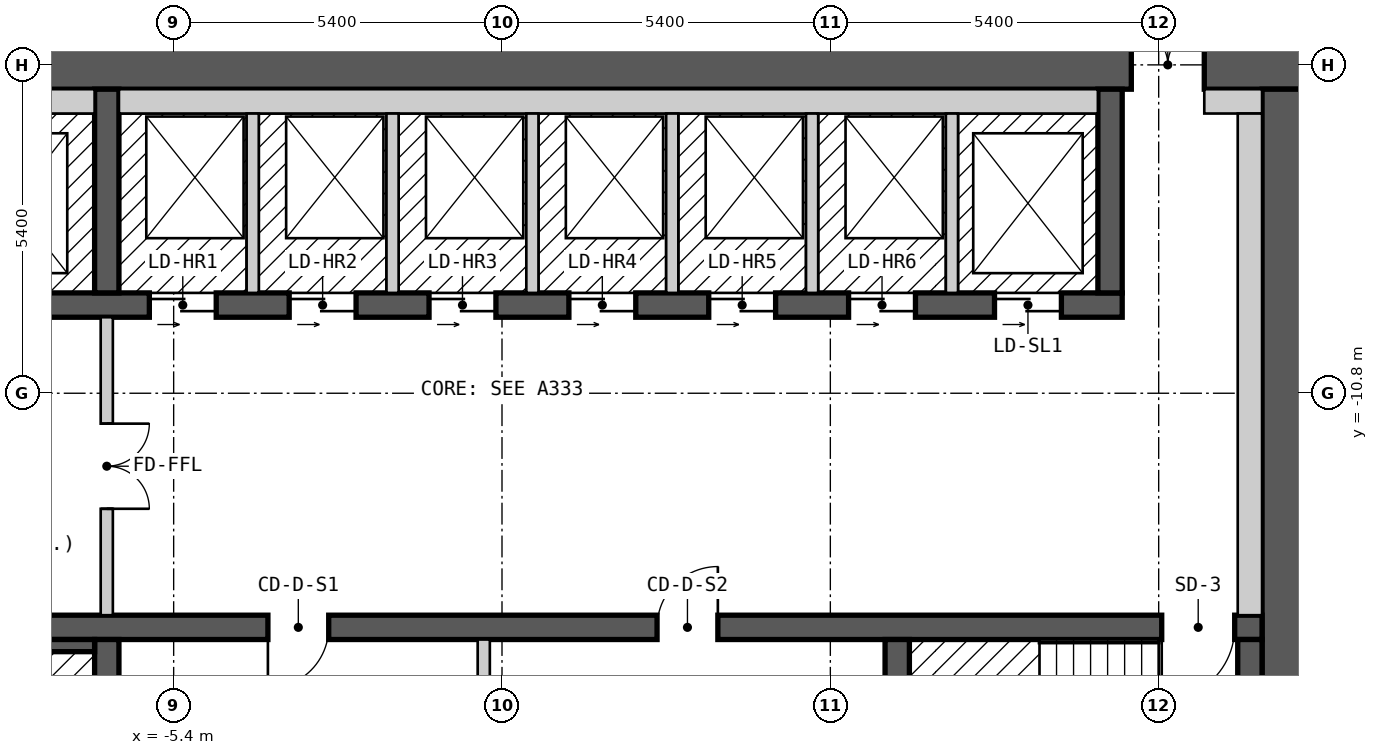
"""IFC4 building model, lengths in metres.
Left out: names, types, materials, properties, quantities, classifications, styles, units other than length and angle.
Written with IfcOpenShell. Run it as: python <this file> out.ifc"""

import sys

from ifc_helpers import new_model, si_unit, direction, frame, frame_2d, origin, place, context, subcontext, project, spatial, rectangle, extrude, element, fill, save


model = new_model("IFC4")
c1 = context("Model", 3, precision=1e-05, world=origin(), true_north=direction((0.0, 1.0)))
c2 = subcontext(c1, "Body", "Model", "MODEL_VIEW")
j1 = project(units=[si_unit("LENGTHUNIT", "METRE"), si_unit("PLANEANGLEUNIT", "RADIAN")], contexts=[c1])
p1 = place(None, origin())
s1 = spatial("IfcSite", under=j1, at=p1, CompositionType="ELEMENT")
p2 = place(p1, origin())
s2 = spatial("IfcBuilding", under=s1, at=p2, CompositionType="ELEMENT")
p3 = place(p2, frame((0.0, 0.0, 117.6)))
s3 = spatial("IfcBuildingStorey", under=s2, at=p3, CompositionType="ELEMENT", Elevation=117.6)
p4 = place(p3, frame((-13.3, -5.4, 0.0), z_axis=(0.0, 0.0, 1.0), x_axis=(1.0, 0.0, 0.0)))
e1 = element("IfcWall", 1, at=p4, inside=s3, PredefinedType="SHEAR", context=c2, shape_type="SweptSolid", body=[
    extrude(rectangle(XDim=26.6, YDim=0.8, at=frame_2d((13.3, 0.0))), origin(), (0.0, 0.0, 1.0), 2.7),
])
p5 = place(p4, frame((23.65, 0.0, 0.0)))
e2 = element("IfcOpeningElement", 2, at=p5, cuts=e1, PredefinedType="OPENING", context=c2, shape_type="SweptSolid", body=[
    extrude(rectangle(XDim=1.2, YDim=2.1, at=frame_2d((0.6, 1.05))), frame((0.0, 0.41, 0.0), z_axis=(0.0, -1.0, 0.0), x_axis=(1.0, 0.0, 0.0)), (0.0, 0.0, 1.0), 0.82),
])
p6 = place(p3, frame((12.9, -18.2, 0.0), z_axis=(0.0, 0.0, 1.0), x_axis=(0.0, 1.0, 0.0)))
e3 = element("IfcWall", 3, at=p6, inside=s3, PredefinedType="SHEAR", context=c2, shape_type="SweptSolid", body=[
    extrude(rectangle(XDim=12.4, YDim=0.8, at=frame_2d((6.2, 0.0))), origin(), (0.0, 0.0, 1.0), 2.7),
])
p7 = place(p3, frame((-12.5, -14.65, 0.0), z_axis=(0.0, 0.0, 1.0), x_axis=(1.0, 0.0, 0.0)))
e4 = element("IfcWall", 4, at=p7, inside=s3, PredefinedType="SHEAR", context=c2, shape_type="SweptSolid", body=[
    extrude(rectangle(XDim=25.0, YDim=0.4, at=frame_2d((12.5, 0.0))), origin(), (0.0, 0.0, 1.0), 2.7),
])
p8 = place(p7, frame((1.7, 0.0, 0.0), z_axis=(0.0, 0.0, 1.0), x_axis=(-1.0, 0.0, 0.0)))
e5 = element("IfcOpeningElement", 5, at=p8, cuts=e4, PredefinedType="OPENING", context=c2, shape_type="SweptSolid", body=[
    extrude(rectangle(XDim=1.2, YDim=2.1, at=frame_2d((0.6, 1.05))), frame((0.0, 0.21, 0.0), z_axis=(0.0, -1.0, 0.0), x_axis=(1.0, 0.0, 0.0)), (0.0, 0.0, 1.0), 0.42),
])
p9 = place(p7, frame((24.55, 0.0, 0.0), z_axis=(0.0, 0.0, 1.0), x_axis=(-1.0, 0.0, 0.0)))
e6 = element("IfcOpeningElement", 6, at=p9, cuts=e4, PredefinedType="OPENING", context=c2, shape_type="SweptSolid", body=[
    extrude(rectangle(XDim=1.2, YDim=2.1, at=frame_2d((0.6, 1.05))), frame((0.0, 0.21, 0.0), z_axis=(0.0, -1.0, 0.0), x_axis=(1.0, 0.0, 0.0)), (0.0, 0.0, 1.0), 0.42),
])
p10 = place(p7, frame((9.65, 0.0, 0.0), z_axis=(0.0, 0.0, 1.0), x_axis=(-1.0, 0.0, 0.0)))
e7 = element("IfcOpeningElement", 7, at=p10, cuts=e4, PredefinedType="OPENING", context=c2, shape_type="SweptSolid", body=[
    extrude(rectangle(XDim=1.0, YDim=2.1, at=frame_2d((0.5, 1.05))), frame((0.0, 0.21, 0.0), z_axis=(0.0, -1.0, 0.0), x_axis=(1.0, 0.0, 0.0)), (0.0, 0.0, 1.0), 0.42),
])
p11 = place(p7, frame((16.05, 0.0, 0.0), z_axis=(0.0, 0.0, 1.0), x_axis=(-1.0, 0.0, 0.0)))
e8 = element("IfcOpeningElement", 8, at=p11, cuts=e4, PredefinedType="OPENING", context=c2, shape_type="SweptSolid", body=[
    extrude(rectangle(XDim=1.0, YDim=2.1, at=frame_2d((0.5, 1.05))), frame((0.0, 0.21, 0.0), z_axis=(0.0, -1.0, 0.0), x_axis=(1.0, 0.0, 0.0)), (0.0, 0.0, 1.0), 0.42),
])
p12 = place(p3, frame((-12.5, -9.35, 0.0), z_axis=(0.0, 0.0, 1.0), x_axis=(1.0, 0.0, 0.0)))
e9 = element("IfcWall", 9, at=p12, inside=s3, PredefinedType="SHEAR", context=c2, shape_type="SweptSolid", body=[
    extrude(rectangle(XDim=22.7, YDim=0.4, at=frame_2d((11.35, 0.0))), origin(), (0.0, 0.0, 1.0), 2.7),
])
p13 = place(p12, frame((1.1, 0.0, 0.0)))
e10 = element("IfcOpeningElement", 10, at=p13, cuts=e9, PredefinedType="OPENING", context=c2, shape_type="SweptSolid", body=[
    extrude(rectangle(XDim=1.1, YDim=2.1, at=frame_2d((0.55, 1.05))), frame((0.0, 0.21, 0.0), z_axis=(0.0, -1.0, 0.0), x_axis=(1.0, 0.0, 0.0)), (0.0, 0.0, 1.0), 0.42),
])
p14 = place(p12, frame((3.9, 0.0, 0.0)))
e11 = element("IfcOpeningElement", 11, at=p14, cuts=e9, PredefinedType="OPENING", context=c2, shape_type="SweptSolid", body=[
    extrude(rectangle(XDim=1.1, YDim=2.1, at=frame_2d((0.55, 1.05))), frame((0.0, 0.21, 0.0), z_axis=(0.0, -1.0, 0.0), x_axis=(1.0, 0.0, 0.0)), (0.0, 0.0, 1.0), 0.42),
])
p15 = place(p12, frame((6.7, 0.0, 0.0)))
e12 = element("IfcOpeningElement", 12, at=p15, cuts=e9, PredefinedType="OPENING", context=c2, shape_type="SweptSolid", body=[
    extrude(rectangle(XDim=1.1, YDim=2.1, at=frame_2d((0.55, 1.05))), frame((0.0, 0.21, 0.0), z_axis=(0.0, -1.0, 0.0), x_axis=(1.0, 0.0, 0.0)), (0.0, 0.0, 1.0), 0.42),
])
p16 = place(p12, frame((9.0, 0.0, 0.0)))
e13 = element("IfcOpeningElement", 13, at=p16, cuts=e9, PredefinedType="OPENING", context=c2, shape_type="SweptSolid", body=[
    extrude(rectangle(XDim=1.1, YDim=2.1, at=frame_2d((0.55, 1.05))), frame((0.0, 0.21, 0.0), z_axis=(0.0, -1.0, 0.0), x_axis=(1.0, 0.0, 0.0)), (0.0, 0.0, 1.0), 0.42),
])
p17 = place(p12, frame((11.3, 0.0, 0.0)))
e14 = element("IfcOpeningElement", 14, at=p17, cuts=e9, PredefinedType="OPENING", context=c2, shape_type="SweptSolid", body=[
    extrude(rectangle(XDim=1.1, YDim=2.1, at=frame_2d((0.55, 1.05))), frame((0.0, 0.21, 0.0), z_axis=(0.0, -1.0, 0.0), x_axis=(1.0, 0.0, 0.0)), (0.0, 0.0, 1.0), 0.42),
])
p18 = place(p12, frame((13.6, 0.0, 0.0)))
e15 = element("IfcOpeningElement", 15, at=p18, cuts=e9, PredefinedType="OPENING", context=c2, shape_type="SweptSolid", body=[
    extrude(rectangle(XDim=1.1, YDim=2.1, at=frame_2d((0.55, 1.05))), frame((0.0, 0.21, 0.0), z_axis=(0.0, -1.0, 0.0), x_axis=(1.0, 0.0, 0.0)), (0.0, 0.0, 1.0), 0.42),
])
p19 = place(p12, frame((15.9, 0.0, 0.0)))
e16 = element("IfcOpeningElement", 16, at=p19, cuts=e9, PredefinedType="OPENING", context=c2, shape_type="SweptSolid", body=[
    extrude(rectangle(XDim=1.1, YDim=2.1, at=frame_2d((0.55, 1.05))), frame((0.0, 0.21, 0.0), z_axis=(0.0, -1.0, 0.0), x_axis=(1.0, 0.0, 0.0)), (0.0, 0.0, 1.0), 0.42),
])
p20 = place(p12, frame((18.2, 0.0, 0.0)))
e17 = element("IfcOpeningElement", 17, at=p20, cuts=e9, PredefinedType="OPENING", context=c2, shape_type="SweptSolid", body=[
    extrude(rectangle(XDim=1.1, YDim=2.1, at=frame_2d((0.55, 1.05))), frame((0.0, 0.21, 0.0), z_axis=(0.0, -1.0, 0.0), x_axis=(1.0, 0.0, 0.0)), (0.0, 0.0, 1.0), 0.42),
])
p21 = place(p12, frame((20.6, 0.0, 0.0)))
e18 = element("IfcOpeningElement", 18, at=p21, cuts=e9, PredefinedType="OPENING", context=c2, shape_type="SweptSolid", body=[
    extrude(rectangle(XDim=1.1, YDim=2.1, at=frame_2d((0.55, 1.05))), frame((0.0, 0.21, 0.0), z_axis=(0.0, -1.0, 0.0), x_axis=(1.0, 0.0, 0.0)), (0.0, 0.0, 1.0), 0.42),
])
for number, where, z_axis, x_axis in (
    (19, (-6.5, -18.2, 0.0), (0.0, 0.0, 1.0), (0.0, 1.0, 0.0)),
    (20, (6.5, -18.2, 0.0), (0.0, 0.0, 1.0), (0.0, 1.0, 0.0)),
    (21, (-6.5, -9.15, 0.0), (0.0, 0.0, 1.0), (0.0, 1.0, 0.0)),
    (22, (10.0, -9.15, 0.0), (0.0, 0.0, 1.0), (0.0, 1.0, 0.0)),
):
    element("IfcWall", number, at=place(p3, frame(where, z_axis=z_axis, x_axis=x_axis)), inside=s3, PredefinedType="SHEAR", context=c2, shape_type="SweptSolid", body=[
        extrude(rectangle(XDim=3.35, YDim=0.4, at=frame_2d((1.675, 0.0))), origin(), (0.0, 0.0, 1.0), 2.7),
    ])
p22 = place(p3, frame((-12.1, -6.0, 0.0), z_axis=(0.0, 0.0, 1.0), x_axis=(1.0, 0.0, 0.0)))
e23 = element("IfcWall", 23, at=p22, inside=s3, PredefinedType="SOLIDWALL", context=c2, shape_type="SweptSolid", body=[
    extrude(rectangle(XDim=5.4, YDim=0.4, at=frame_2d((2.7, 0.0))), origin(), (0.0, 0.0, 1.0), 2.7),
])
p23 = place(p3, frame((-10.8, -14.95, 0.0), z_axis=(0.0, 0.0, 1.0), x_axis=(1.0, 0.0, 0.0)))
e24 = element("IfcWall", 24, at=p23, inside=s3, PredefinedType="SOLIDWALL", context=c2, shape_type="SweptSolid", body=[
    extrude(rectangle(XDim=4.1, YDim=0.2, at=frame_2d((2.05, 0.0))), origin(), (0.0, 0.0, 1.0), 2.7),
])
p24 = place(p3, frame((-6.5, -14.45, 0.0), z_axis=(0.0, 0.0, 1.0), x_axis=(0.0, 1.0, 0.0)))
e25 = element("IfcWall", 25, at=p24, inside=s3, PredefinedType="PARTITIONING", context=c2, shape_type="SweptSolid", body=[
    extrude(rectangle(XDim=4.9, YDim=0.2, at=frame_2d((2.45, 0.0))), origin(), (0.0, 0.0, 1.0), 2.7),
])
p25 = place(p24, frame((3.15, 0.0, 0.0), z_axis=(0.0, 0.0, 1.0), x_axis=(-1.0, 0.0, 0.0)))
e26 = element("IfcOpeningElement", 26, at=p25, cuts=e25, PredefinedType="OPENING", context=c2, shape_type="SweptSolid", body=[
    extrude(rectangle(XDim=1.4, YDim=2.1, at=frame_2d((0.7, 1.05))), frame((0.0, 0.11, 0.0), z_axis=(0.0, -1.0, 0.0), x_axis=(1.0, 0.0, 0.0)), (0.0, 0.0, 1.0), 0.22),
])
p26 = place(p3, frame((-6.3, -6.0, 0.0), z_axis=(0.0, 0.0, 1.0), x_axis=(1.0, 0.0, 0.0)))
e27 = element("IfcWall", 27, at=p26, inside=s3, PredefinedType="SOLIDWALL", context=c2, shape_type="SweptSolid", body=[
    extrude(rectangle(XDim=16.1, YDim=0.4, at=frame_2d((8.05, 0.0))), origin(), (0.0, 0.0, 1.0), 2.7),
])
for number, where, z_axis, x_axis in (
    (28, (-4.1, -9.15, 0.0), (0.0, 0.0, 1.0), (0.0, 1.0, 0.0)),
    (29, (-1.8, -9.15, 0.0), (0.0, 0.0, 1.0), (0.0, 1.0, 0.0)),
):
    element("IfcWall", number, at=place(p3, frame(where, z_axis=z_axis, x_axis=x_axis)), inside=s3, PredefinedType="SOLIDWALL", context=c2, shape_type="SweptSolid", body=[
        extrude(rectangle(XDim=2.95, YDim=0.2, at=frame_2d((1.475, 0.0))), origin(), (0.0, 0.0, 1.0), 2.7),
    ])
p27 = place(p3, frame((-0.3, -17.8, 0.0), z_axis=(0.0, 0.0, 1.0), x_axis=(0.0, 1.0, 0.0)))
e30 = element("IfcWall", 30, at=p27, inside=s3, PredefinedType="PARTITIONING", context=c2, shape_type="SweptSolid", body=[
    extrude(rectangle(XDim=2.95, YDim=0.2, at=frame_2d((1.475, 0.0))), origin(), (0.0, 0.0, 1.0), 2.7),
])
for number, where, z_axis, x_axis in (
    (31, (0.5, -9.15, 0.0), (0.0, 0.0, 1.0), (0.0, 1.0, 0.0)),
    (32, (2.8, -9.15, 0.0), (0.0, 0.0, 1.0), (0.0, 1.0, 0.0)),
    (33, (5.1, -9.15, 0.0), (0.0, 0.0, 1.0), (0.0, 1.0, 0.0)),
    (34, (7.4, -9.15, 0.0), (0.0, 0.0, 1.0), (0.0, 1.0, 0.0)),
):
    element("IfcWall", number, at=place(p3, frame(where, z_axis=z_axis, x_axis=x_axis)), inside=s3, PredefinedType="SOLIDWALL", context=c2, shape_type="SweptSolid", body=[
        extrude(rectangle(XDim=2.95, YDim=0.2, at=frame_2d((1.475, 0.0))), origin(), (0.0, 0.0, 1.0), 2.7),
    ])
p28 = place(p3, frame((11.55, -6.0, 0.0), z_axis=(0.0, 0.0, 1.0), x_axis=(1.0, 0.0, 0.0)))
e35 = element("IfcWall", 35, at=p28, inside=s3, PredefinedType="PARTITIONING", context=c2, shape_type="SweptSolid", body=[
    extrude(rectangle(XDim=0.95, YDim=0.4, at=frame_2d((0.475, 0.0))), origin(), (0.0, 0.0, 1.0), 2.7),
])
p29 = place(p3, frame((12.3, -17.6, 0.0), z_axis=(0.0, 0.0, 1.0), x_axis=(0.0, 1.0, 0.0)))
e36 = element("IfcWall", 36, at=p29, inside=s3, PredefinedType="SOLIDWALL", context=c2, shape_type="SweptSolid", body=[
    extrude(rectangle(XDim=2.75, YDim=0.4, at=frame_2d((1.375, 0.0))), origin(), (0.0, 0.0, 1.0), 2.7),
])
p30 = place(p3, frame((12.3, -14.45, 0.0), z_axis=(0.0, 0.0, 1.0), x_axis=(0.0, 1.0, 0.0)))
e37 = element("IfcWall", 37, at=p30, inside=s3, PredefinedType="PARTITIONING", context=c2, shape_type="SweptSolid", body=[
    extrude(rectangle(XDim=8.25, YDim=0.4, at=frame_2d((4.125, 0.0))), origin(), (0.0, 0.0, 1.0), 2.7),
])
p31 = place(p15, origin())
e38 = element("IfcDoor", 38, at=p31, inside=s3, OperationType="DOUBLE_DOOR_SLIDING", PredefinedType="DOOR", context=c2, shape_type="SweptSolid", body=[
    extrude(rectangle(XDim=1.1, YDim=2.1, at=frame_2d((0.55, 1.05))), frame((0.0, 0.025, 0.0), z_axis=(0.0, -1.0, 0.0), x_axis=(1.0, 0.0, 0.0)), (0.0, 0.0, 1.0), 0.05),
])
fill(e12, e38)
p32 = place(p16, origin())
e39 = element("IfcDoor", 39, at=p32, inside=s3, OperationType="DOUBLE_DOOR_SLIDING", PredefinedType="DOOR", context=c2, shape_type="SweptSolid", body=[
    extrude(rectangle(XDim=1.1, YDim=2.1, at=frame_2d((0.55, 1.05))), frame((0.0, 0.025, 0.0), z_axis=(0.0, -1.0, 0.0), x_axis=(1.0, 0.0, 0.0)), (0.0, 0.0, 1.0), 0.05),
])
fill(e13, e39)
p33 = place(p17, origin())
e40 = element("IfcDoor", 40, at=p33, inside=s3, OperationType="DOUBLE_DOOR_SLIDING", PredefinedType="DOOR", context=c2, shape_type="SweptSolid", body=[
    extrude(rectangle(XDim=1.1, YDim=2.1, at=frame_2d((0.55, 1.05))), frame((0.0, 0.025, 0.0), z_axis=(0.0, -1.0, 0.0), x_axis=(1.0, 0.0, 0.0)), (0.0, 0.0, 1.0), 0.05),
])
fill(e14, e40)
p34 = place(p18, origin())
e41 = element("IfcDoor", 41, at=p34, inside=s3, OperationType="DOUBLE_DOOR_SLIDING", PredefinedType="DOOR", context=c2, shape_type="SweptSolid", body=[
    extrude(rectangle(XDim=1.1, YDim=2.1, at=frame_2d((0.55, 1.05))), frame((0.0, 0.025, 0.0), z_axis=(0.0, -1.0, 0.0), x_axis=(1.0, 0.0, 0.0)), (0.0, 0.0, 1.0), 0.05),
])
fill(e15, e41)
p35 = place(p19, origin())
e42 = element("IfcDoor", 42, at=p35, inside=s3, OperationType="DOUBLE_DOOR_SLIDING", PredefinedType="DOOR", context=c2, shape_type="SweptSolid", body=[
    extrude(rectangle(XDim=1.1, YDim=2.1, at=frame_2d((0.55, 1.05))), frame((0.0, 0.025, 0.0), z_axis=(0.0, -1.0, 0.0), x_axis=(1.0, 0.0, 0.0)), (0.0, 0.0, 1.0), 0.05),
])
fill(e16, e42)
p36 = place(p20, origin())
e43 = element("IfcDoor", 43, at=p36, inside=s3, OperationType="DOUBLE_DOOR_SLIDING", PredefinedType="DOOR", context=c2, shape_type="SweptSolid", body=[
    extrude(rectangle(XDim=1.1, YDim=2.1, at=frame_2d((0.55, 1.05))), frame((0.0, 0.025, 0.0), z_axis=(0.0, -1.0, 0.0), x_axis=(1.0, 0.0, 0.0)), (0.0, 0.0, 1.0), 0.05),
])
fill(e17, e43)
p37 = place(p21, origin())
e44 = element("IfcDoor", 44, at=p37, inside=s3, OperationType="DOUBLE_DOOR_SLIDING", PredefinedType="DOOR", context=c2, shape_type="SweptSolid", body=[
    extrude(rectangle(XDim=1.1, YDim=2.1, at=frame_2d((0.55, 1.05))), frame((0.0, 0.025, 0.0), z_axis=(0.0, -1.0, 0.0), x_axis=(1.0, 0.0, 0.0)), (0.0, 0.0, 1.0), 0.05),
])
fill(e18, e44)
p38 = place(p9, origin())
e45 = element("IfcDoor", 45, at=p38, inside=s3, OperationType="SINGLE_SWING_RIGHT", PredefinedType="DOOR", context=c2, shape_type="SweptSolid", body=[
    extrude(rectangle(XDim=1.2, YDim=2.1, at=frame_2d((0.6, 1.05))), frame((0.0, 0.025, 0.0), z_axis=(0.0, -1.0, 0.0), x_axis=(1.0, 0.0, 0.0)), (0.0, 0.0, 1.0), 0.05),
])
fill(e6, e45)
p39 = place(p25, origin())
e46 = element("IfcDoor", 46, at=p39, inside=s3, OperationType="DOUBLE_DOOR_SINGLE_SWING", PredefinedType="DOOR", context=c2, shape_type="SweptSolid", body=[
    extrude(rectangle(XDim=1.4, YDim=2.1, at=frame_2d((0.7, 1.05))), frame((0.0, 0.025, 0.0), z_axis=(0.0, -1.0, 0.0), x_axis=(1.0, 0.0, 0.0)), (0.0, 0.0, 1.0), 0.05),
])
fill(e26, e46)
p40 = place(p5, origin())
e47 = element("IfcDoor", 47, at=p40, inside=s3, OperationType="DOUBLE_DOOR_SINGLE_SWING", PredefinedType="DOOR", context=c2, shape_type="SweptSolid", body=[
    extrude(rectangle(XDim=1.2, YDim=2.1, at=frame_2d((0.6, 1.05))), frame((0.0, 0.025, 0.0), z_axis=(0.0, -1.0, 0.0), x_axis=(1.0, 0.0, 0.0)), (0.0, 0.0, 1.0), 0.05),
])
fill(e2, e47)
p41 = place(p10, origin())
e48 = element("IfcDoor", 48, at=p41, inside=s3, OperationType="SINGLE_SWING_RIGHT", PredefinedType="DOOR", context=c2, shape_type="SweptSolid", body=[
    extrude(rectangle(XDim=1.0, YDim=2.1, at=frame_2d((0.5, 1.05))), frame((0.0, 0.025, 0.0), z_axis=(0.0, -1.0, 0.0), x_axis=(1.0, 0.0, 0.0)), (0.0, 0.0, 1.0), 0.05),
])
fill(e7, e48)
p42 = place(p11, origin())
e49 = element("IfcDoor", 49, at=p42, inside=s3, OperationType="SINGLE_SWING_LEFT", PredefinedType="DOOR", context=c2, shape_type="SweptSolid", body=[
    extrude(rectangle(XDim=1.0, YDim=2.1, at=frame_2d((0.5, 1.05))), frame((0.0, 0.025, 0.0), z_axis=(0.0, -1.0, 0.0), x_axis=(1.0, 0.0, 0.0)), (0.0, 0.0, 1.0), 0.05),
])
fill(e8, e49)
save(model, sys.argv[1])
